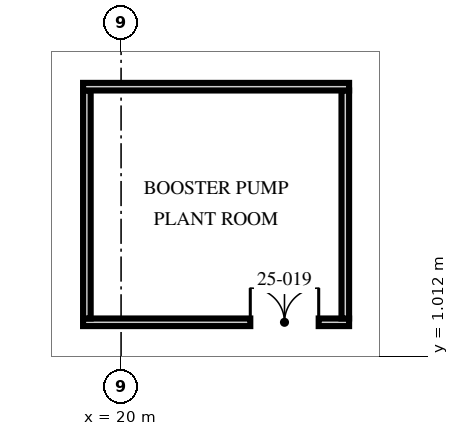
"""IFC4 building model, lengths in metres.
Left out: names, types, materials, properties, quantities, classifications, styles, units other than length and angle.
Written with IfcOpenShell. Run it as: python <this file> out.ifc"""

import sys

from ifc_helpers import new_model, si_unit, direction, frame, frame_2d, origin, origin_2d, place, context, subcontext, project, spatial, rectangle, hollow_rectangle, extrude, element, fill, save


model = new_model("IFC4")
c1 = context("Model", 3, precision=1e-05, world=origin(), true_north=direction((0.0, 1.0)))
c2 = subcontext(c1, "Body", "Model", "MODEL_VIEW")
j1 = project(units=[si_unit("LENGTHUNIT", "METRE"), si_unit("PLANEANGLEUNIT", "RADIAN")], contexts=[c1])
p1 = place(None, origin())
s1 = spatial("IfcSite", under=j1, at=p1, CompositionType="ELEMENT")
p2 = place(p1, origin())
s2 = spatial("IfcBuilding", under=s1, at=p2, CompositionType="ELEMENT")
p3 = place(p2, frame((0.0, 0.0, 99.75)))
s3 = spatial("IfcBuildingStorey", under=s2, at=p3, CompositionType="ELEMENT", Elevation=99.75)
p4 = place(p3, frame((29.8, 10.0, -0.65), z_axis=(-0.332963994967, -0.103601510687, 0.937230870724), x_axis=(-0.034712905596, 0.994618884766, 0.097612951251)))
e1 = element("IfcColumn", 1, at=p4, inside=s3, PredefinedType="COLUMN", context=c2, shape_type="SweptSolid", body=[
    extrude(hollow_rectangle(XDim=3.2, YDim=1.8, WallThickness=0.2, at=origin_2d()), origin(), (0.0, 0.0, 1.0), 8.109),
])
p5 = place(p3, frame((29.8, 0.0, -0.65), z_axis=(-0.334765406017, 0.0, 0.942301503201), x_axis=(0.0, 1.0, 0.0)))
e2 = element("IfcColumn", 2, at=p5, inside=s3, PredefinedType="COLUMN", context=c2, shape_type="SweptSolid", body=[
    extrude(hollow_rectangle(XDim=3.2, YDim=1.8, WallThickness=0.2, at=origin_2d()), origin(), (0.0, 0.0, 1.0), 8.065),
])
p6 = place(p3, frame((19.0, 1.9, 0.0), z_axis=(0.0, 0.0, 1.0), x_axis=(1.0, 0.0, 0.0)))
e3 = element("IfcWall", 3, at=p6, inside=s3, PredefinedType="SOLIDWALL", context=c2, shape_type="SweptSolid", body=[
    extrude(rectangle(XDim=7.0, YDim=0.2, at=frame_2d((3.5, 0.0))), origin(), (0.0, 0.0, 1.0), 7.25),
])
p7 = place(p6, frame((4.4, 0.0, 0.0)))
e4 = element("IfcOpeningElement", 4, at=p7, cuts=e3, PredefinedType="OPENING", context=c2, shape_type="SweptSolid", body=[
    extrude(rectangle(XDim=1.8, YDim=2.4, at=frame_2d((0.9, 1.2))), frame((0.0, 0.11, 0.0), z_axis=(0.0, -1.0, 0.0), x_axis=(1.0, 0.0, 0.0)), (0.0, 0.0, 1.0), 0.22),
])
for number, where, z_axis, x_axis in (
    (5, (19.1, 2.0, 0.0), (0.0, 0.0, 1.0), (0.0, 1.0, 0.0)),
    (6, (25.9, 2.0, 0.0), (0.0, 0.0, 1.0), (0.0, 1.0, 0.0)),
):
    element("IfcWall", number, at=place(p3, frame(where, z_axis=z_axis, x_axis=x_axis)), inside=s3, PredefinedType="SOLIDWALL", context=c2, shape_type="SweptSolid", body=[
        extrude(rectangle(XDim=6.0, YDim=0.2, at=frame_2d((3.0, 0.0))), origin(), (0.0, 0.0, 1.0), 6.46),
    ])
p8 = place(p3, frame((19.0, 8.1, 0.0), z_axis=(0.0, 0.0, 1.0), x_axis=(1.0, 0.0, 0.0)))
e7 = element("IfcWall", 7, at=p8, inside=s3, PredefinedType="SOLIDWALL", context=c2, shape_type="SweptSolid", body=[
    extrude(rectangle(XDim=7.0, YDim=0.2, at=frame_2d((3.5, 0.0))), origin(), (0.0, 0.0, 1.0), 7.25),
])
p9 = place(p7, origin())
e8 = element("IfcDoor", 8, at=p9, inside=s3, OperationType="DOUBLE_DOOR_SINGLE_SWING", PredefinedType="DOOR", context=c2, shape_type="SweptSolid", body=[
    extrude(rectangle(XDim=1.8, YDim=2.4, at=frame_2d((0.9, 1.2))), frame((0.0, 0.025, 0.0), z_axis=(0.0, -1.0, 0.0), x_axis=(1.0, 0.0, 0.0)), (0.0, 0.0, 1.0), 0.05),
])
fill(e4, e8)
save(model, sys.argv[1])
